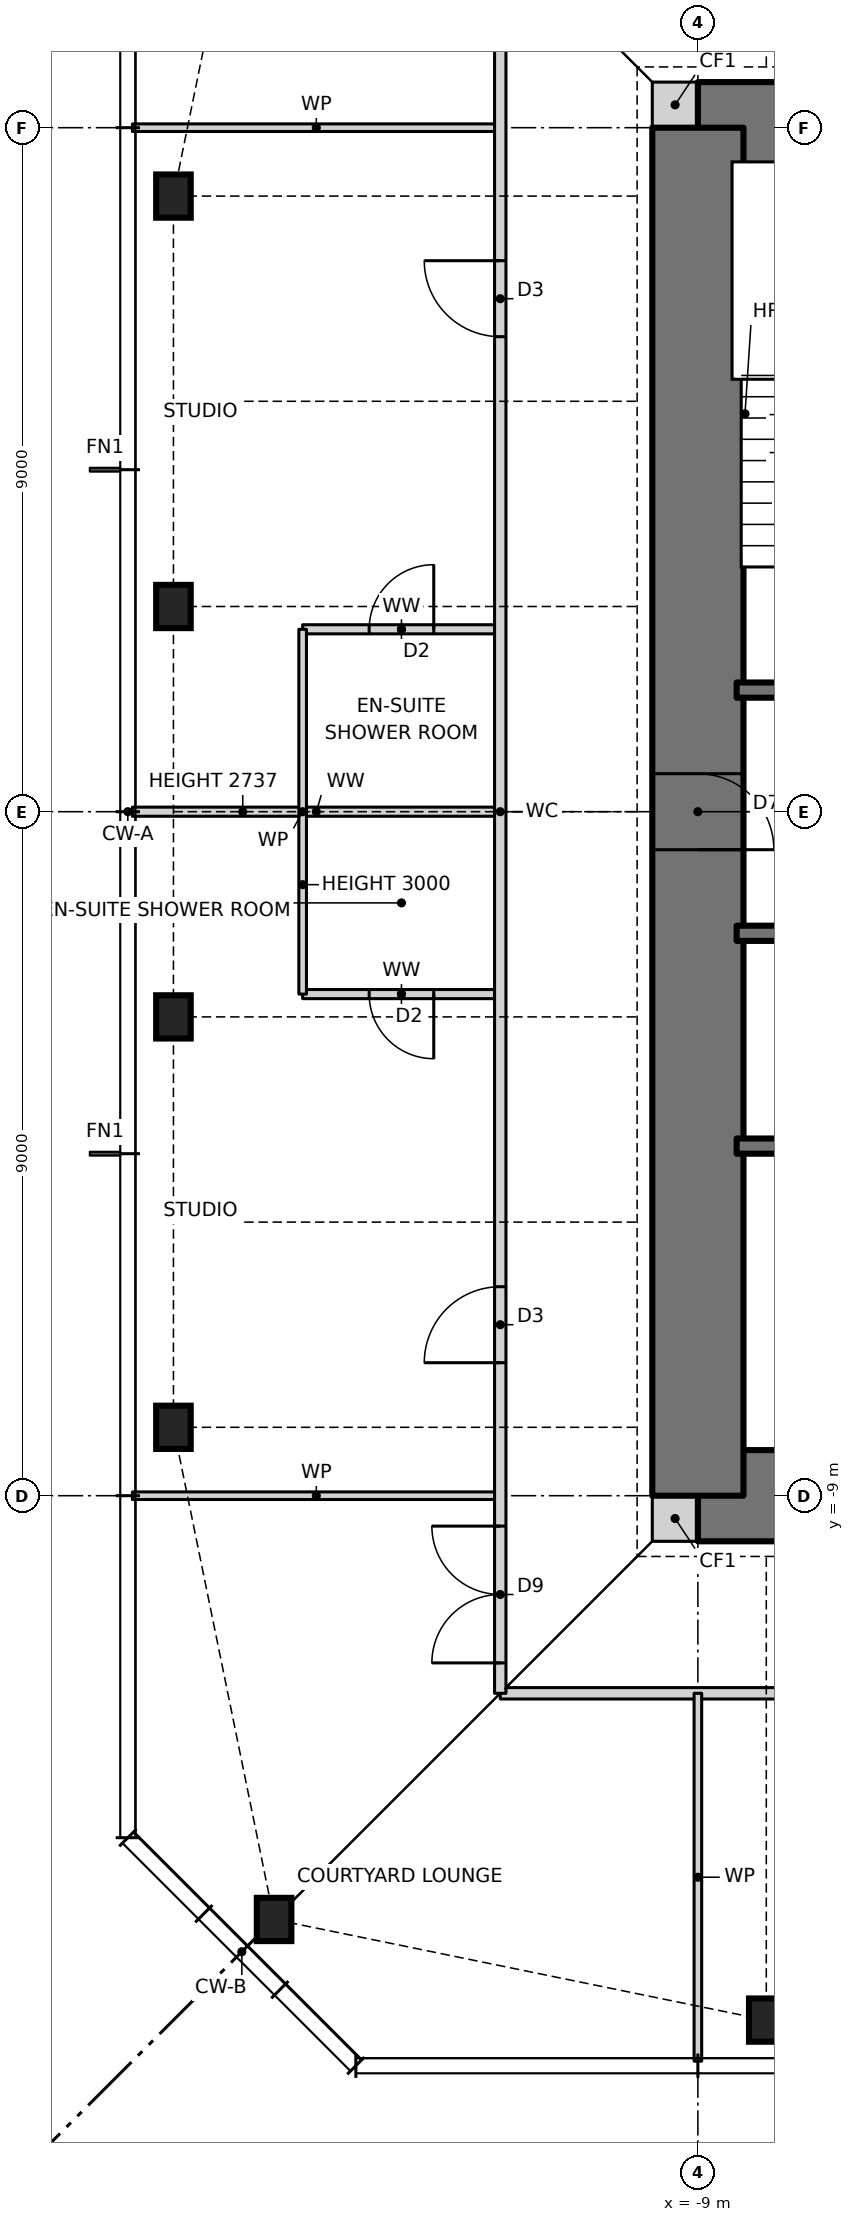
"""IFC4 building model, lengths in metres.
Left out: names, types, materials, properties, quantities, classifications, styles, units other than length and angle.
Written with IfcOpenShell. Run it as: python <this file> out.ifc"""

import sys

from ifc_helpers import new_model, si_unit, direction, frame, frame_2d, origin, origin_2d, place, context, subcontext, project, spatial, rectangle, i_section, extrude, element, fill, save


model = new_model("IFC4")
c1 = context("Model", 3, precision=1e-05, world=origin(), true_north=direction((0.0, 1.0)))
c2 = subcontext(c1, "Body", "Model", "MODEL_VIEW")
j1 = project(units=[si_unit("LENGTHUNIT", "METRE"), si_unit("PLANEANGLEUNIT", "RADIAN")], contexts=[c1])
p1 = place(None, origin())
s1 = spatial("IfcSite", under=j1, at=p1, CompositionType="ELEMENT")
p2 = place(p1, origin())
s2 = spatial("IfcBuilding", under=s1, at=p2, CompositionType="ELEMENT")
p3 = place(p2, frame((0.0, 0.0, 250.0)))
s3 = spatial("IfcBuildingStorey", under=s2, at=p3, CompositionType="ELEMENT", Elevation=250.0)
for number, where, z_axis, x_axis in (
    (1, (-14.576, -14.576, 0.0), (0.0, 0.0, 1.0), (1.0, 0.0, 0.0)),
    (2, (-8.1, -15.9, 0.0), (0.0, 0.0, 1.0), (1.0, 0.0, 0.0)),
    (3, (-15.9, 8.1, 0.0), (0.0, 0.0, 1.0), (1.0, 0.0, 0.0)),
    (4, (-15.9, 2.7, 0.0), (0.0, 0.0, 1.0), (1.0, 0.0, 0.0)),
    (5, (-15.9, -2.7, 0.0), (0.0, 0.0, 1.0), (1.0, 0.0, 0.0)),
    (6, (-15.9, -8.1, 0.0), (0.0, 0.0, 1.0), (1.0, 0.0, 0.0)),
):
    element("IfcColumn", number, at=place(p3, frame(where, z_axis=z_axis, x_axis=x_axis)), inside=s3, PredefinedType="COLUMN", context=c2, shape_type="SweptSolid", body=[
        extrude(i_section(OverallWidth=0.455, OverallDepth=0.569, WebThickness=0.078, FlangeThickness=0.125, at=origin_2d()), origin(), (0.0, 0.0, 1.0), 3.5),
    ])
for number, where, z_axis, x_axis in (
    (7, (-9.6, -9.3, 0.0), (0.0, 0.0, 1.0), (1.0, 0.0, 0.0)),
    (8, (-9.6, 9.3, 0.0), (0.0, 0.0, 1.0), (1.0, 0.0, 0.0)),
):
    element("IfcWall", number, at=place(p3, frame(where, z_axis=z_axis, x_axis=x_axis)), inside=s3, PredefinedType="SOLIDWALL", context=c2, shape_type="SweptSolid", body=[
        extrude(rectangle(XDim=0.6, YDim=0.6, at=frame_2d((0.3, 0.0))), origin(), (0.0, 0.0, 1.0), 3.5),
    ])
p4 = place(p3, frame((-9.0, -9.0, 0.0), z_axis=(0.0, 0.0, 1.0), x_axis=(1.0, 0.0, 0.0)))
e9 = element("IfcWall", 9, at=p4, inside=s3, PredefinedType="SHEAR", context=c2, shape_type="SweptSolid", body=[
    extrude(rectangle(XDim=18.0, YDim=1.2, at=frame_2d((9.0, 0.0))), origin(), (0.0, 0.0, 1.0), 3.5),
])
p5 = place(p4, frame((3.775, 0.0, 0.0)))
e10 = element("IfcOpeningElement", 10, at=p5, cuts=e9, PredefinedType="OPENING", context=c2, shape_type="SweptSolid", body=[
    extrude(rectangle(XDim=0.9, YDim=2.1, at=frame_2d((0.45, 1.05))), frame((0.0, 0.61, 0.0), z_axis=(0.0, -1.0, 0.0), x_axis=(1.0, 0.0, 0.0)), (0.0, 0.0, 1.0), 1.22),
])
p6 = place(p4, frame((10.625, 0.0, 0.0)))
e11 = element("IfcOpeningElement", 11, at=p6, cuts=e9, PredefinedType="OPENING", context=c2, shape_type="SweptSolid", body=[
    extrude(rectangle(XDim=0.9, YDim=2.1, at=frame_2d((0.45, 1.05))), frame((0.0, 0.61, 0.0), z_axis=(0.0, -1.0, 0.0), x_axis=(1.0, 0.0, 0.0)), (0.0, 0.0, 1.0), 1.22),
])
p7 = place(p3, frame((9.0, 9.0, 0.0), z_axis=(0.0, 0.0, 1.0), x_axis=(-1.0, 0.0, 0.0)))
e12 = element("IfcWall", 12, at=p7, inside=s3, PredefinedType="SHEAR", context=c2, shape_type="SweptSolid", body=[
    extrude(rectangle(XDim=18.0, YDim=1.2, at=frame_2d((9.0, 0.0))), origin(), (0.0, 0.0, 1.0), 3.5),
])
p8 = place(p7, frame((11.125, 0.0, 0.0)))
e13 = element("IfcOpeningElement", 13, at=p8, cuts=e12, PredefinedType="OPENING", context=c2, shape_type="SweptSolid", body=[
    extrude(rectangle(XDim=0.9, YDim=2.1, at=frame_2d((0.45, 1.05))), frame((0.0, 0.61, 0.0), z_axis=(0.0, -1.0, 0.0), x_axis=(1.0, 0.0, 0.0)), (0.0, 0.0, 1.0), 1.22),
])
p9 = place(p7, frame((4.275, 0.0, 0.0)))
e14 = element("IfcOpeningElement", 14, at=p9, cuts=e12, PredefinedType="OPENING", context=c2, shape_type="SweptSolid", body=[
    extrude(rectangle(XDim=0.9, YDim=2.1, at=frame_2d((0.45, 1.05))), frame((0.0, 0.61, 0.0), z_axis=(0.0, -1.0, 0.0), x_axis=(1.0, 0.0, 0.0)), (0.0, 0.0, 1.0), 1.22),
])
p10 = place(p3, frame((-9.0, 9.0, 0.0), z_axis=(0.0, 0.0, 1.0), x_axis=(0.0, -1.0, 0.0)))
e15 = element("IfcWall", 15, at=p10, inside=s3, PredefinedType="SHEAR", context=c2, shape_type="SweptSolid", body=[
    extrude(rectangle(XDim=18.0, YDim=1.2, at=frame_2d((9.0, 0.0))), origin(), (0.0, 0.0, 1.0), 3.5),
])
p11 = place(p10, frame((8.5, 0.0, 0.0)))
e16 = element("IfcOpeningElement", 16, at=p11, cuts=e15, PredefinedType="OPENING", context=c2, shape_type="SweptSolid", body=[
    extrude(rectangle(XDim=1.0, YDim=2.1, at=frame_2d((0.5, 1.05))), frame((0.0, 0.61, 0.0), z_axis=(0.0, -1.0, 0.0), x_axis=(1.0, 0.0, 0.0)), (0.0, 0.0, 1.0), 1.22),
])
p12 = place(p3, frame((-11.6, -11.6, 0.0), z_axis=(0.0, 0.0, 1.0), x_axis=(1.0, 0.0, 0.0)))
e17 = element("IfcWall", 17, at=p12, inside=s3, PredefinedType="PARTITIONING", context=c2, shape_type="SweptSolid", body=[
    extrude(rectangle(XDim=23.7, YDim=0.15, at=frame_2d((11.85, 0.0))), origin(), (0.0, 0.0, 1.0), 3.27),
])
p13 = place(p12, frame((4.35, 0.0, 0.0)))
e18 = element("IfcOpeningElement", 18, at=p13, cuts=e17, PredefinedType="OPENING", context=c2, shape_type="SweptSolid", body=[
    extrude(rectangle(XDim=1.0, YDim=2.1, at=frame_2d((0.5, 1.05))), frame((0.0, 0.085, 0.0), z_axis=(0.0, -1.0, 0.0), x_axis=(1.0, 0.0, 0.0)), (0.0, 0.0, 1.0), 0.17),
])
p14 = place(p12, frame((17.85, 0.0, 0.0)))
e19 = element("IfcOpeningElement", 19, at=p14, cuts=e17, PredefinedType="OPENING", context=c2, shape_type="SweptSolid", body=[
    extrude(rectangle(XDim=1.0, YDim=2.1, at=frame_2d((0.5, 1.05))), frame((0.0, 0.085, 0.0), z_axis=(0.0, -1.0, 0.0), x_axis=(1.0, 0.0, 0.0)), (0.0, 0.0, 1.0), 0.17),
])
p15 = place(p12, frame((21.725, 0.0, 0.0)))
e20 = element("IfcOpeningElement", 20, at=p15, cuts=e17, PredefinedType="OPENING", context=c2, shape_type="SweptSolid", body=[
    extrude(rectangle(XDim=0.85, YDim=2.1, at=frame_2d((0.425, 1.05))), frame((0.0, 0.085, 0.0), z_axis=(0.0, -1.0, 0.0), x_axis=(1.0, 0.0, 0.0)), (0.0, 0.0, 1.0), 0.17),
])
p16 = place(p3, frame((-16.44, -9.0, 0.0), z_axis=(0.0, 0.0, 1.0), x_axis=(1.0, 0.0, 0.0)))
e21 = element("IfcWall", 21, at=p16, inside=s3, PredefinedType="PARTITIONING", context=c2, shape_type="SweptSolid", body=[
    extrude(rectangle(XDim=4.84, YDim=0.1, at=frame_2d((2.42, 0.0))), origin(), (0.0, 0.0, 1.0), 3.27),
])
p17 = place(p3, frame((-8.49, -4.4, 0.0), z_axis=(0.0, 0.0, 1.0), x_axis=(1.0, 0.0, 0.0)))
e22 = element("IfcWall", 22, at=p17, inside=s3, PredefinedType="SOLIDWALL", context=c2, shape_type="SweptSolid", body=[
    extrude(rectangle(XDim=13.64, YDim=0.2, at=frame_2d((6.82, 0.0))), origin(), (0.0, 0.0, 1.0), 3.5),
])
p18 = place(p3, frame((-14.2, -2.4, 0.0), z_axis=(0.0, 0.0, 1.0), x_axis=(1.0, 0.0, 0.0)))
e23 = element("IfcWall", 23, at=p18, inside=s3, PredefinedType="PARTITIONING", context=c2, shape_type="SweptSolid", body=[
    extrude(rectangle(XDim=2.6, YDim=0.12, at=frame_2d((1.3, 0.0))), origin(), (0.0, 0.0, 1.0), 3.27),
])
p19 = place(p18, frame((0.875, 0.0, 0.0)))
e24 = element("IfcOpeningElement", 24, at=p19, cuts=e23, PredefinedType="OPENING", context=c2, shape_type="SweptSolid", body=[
    extrude(rectangle(XDim=0.85, YDim=2.1, at=frame_2d((0.425, 1.05))), frame((0.0, 0.07, 0.0), z_axis=(0.0, -1.0, 0.0), x_axis=(1.0, 0.0, 0.0)), (0.0, 0.0, 1.0), 0.14),
])
p20 = place(p3, frame((-8.49, -1.6, 0.0), z_axis=(0.0, 0.0, 1.0), x_axis=(1.0, 0.0, 0.0)))
e25 = element("IfcWall", 25, at=p20, inside=s3, PredefinedType="SOLIDWALL", context=c2, shape_type="SweptSolid", body=[
    extrude(rectangle(XDim=16.98, YDim=0.2, at=frame_2d((8.49, 0.0))), origin(), (0.0, 0.0, 1.0), 3.5),
])
p21 = place(p20, frame((14.81, 0.0, 0.0)))
e26 = element("IfcOpeningElement", 26, at=p21, cuts=e25, PredefinedType="OPENING", context=c2, shape_type="SweptSolid", body=[
    extrude(rectangle(XDim=1.0, YDim=2.1, at=frame_2d((0.5, 1.05))), frame((0.0, 0.11, 0.0), z_axis=(0.0, -1.0, 0.0), x_axis=(1.0, 0.0, 0.0)), (0.0, 0.0, 1.0), 0.22),
])
p22 = place(p20, frame((1.232, 0.0, 0.0)))
e27 = element("IfcOpeningElement", 27, at=p22, cuts=e25, PredefinedType="OPENING", context=c2, shape_type="SweptSolid", body=[
    extrude(rectangle(XDim=0.9, YDim=2.1, at=frame_2d((0.45, 1.05))), frame((0.0, 0.11, 0.0), z_axis=(0.0, -1.0, 0.0), x_axis=(1.0, 0.0, 0.0)), (0.0, 0.0, 1.0), 0.22),
])
p23 = place(p20, frame((4.627, 0.0, 0.0)))
e28 = element("IfcOpeningElement", 28, at=p23, cuts=e25, PredefinedType="OPENING", context=c2, shape_type="SweptSolid", body=[
    extrude(rectangle(XDim=0.9, YDim=2.1, at=frame_2d((0.45, 1.05))), frame((0.0, 0.11, 0.0), z_axis=(0.0, -1.0, 0.0), x_axis=(1.0, 0.0, 0.0)), (0.0, 0.0, 1.0), 0.22),
])
p24 = place(p20, frame((8.052, 0.0, 0.0)))
e29 = element("IfcOpeningElement", 29, at=p24, cuts=e25, PredefinedType="OPENING", context=c2, shape_type="SweptSolid", body=[
    extrude(rectangle(XDim=0.9, YDim=2.1, at=frame_2d((0.45, 1.05))), frame((0.0, 0.11, 0.0), z_axis=(0.0, -1.0, 0.0), x_axis=(1.0, 0.0, 0.0)), (0.0, 0.0, 1.0), 0.22),
])
p25 = place(p20, frame((12.42, 0.0, 0.0)))
e30 = element("IfcOpeningElement", 30, at=p25, cuts=e25, PredefinedType="OPENING", context=c2, shape_type="SweptSolid", body=[
    extrude(rectangle(XDim=0.9, YDim=2.1, at=frame_2d((0.45, 1.05))), frame((0.0, 0.11, 0.0), z_axis=(0.0, -1.0, 0.0), x_axis=(1.0, 0.0, 0.0)), (0.0, 0.0, 1.0), 0.22),
])
p26 = place(p20, frame((10.707, 0.0, 0.0)))
e31 = element("IfcOpeningElement", 31, at=p26, cuts=e25, PredefinedType="OPENING", context=c2, shape_type="SweptSolid", body=[
    extrude(rectangle(XDim=0.9, YDim=2.1, at=frame_2d((0.45, 1.05))), frame((0.0, 0.11, 0.0), z_axis=(0.0, -1.0, 0.0), x_axis=(1.0, 0.0, 0.0)), (0.0, 0.0, 1.0), 0.22),
])
p27 = place(p3, frame((-16.44, 0.0, 0.0), z_axis=(0.0, 0.0, 1.0), x_axis=(1.0, 0.0, 0.0)))
e32 = element("IfcWall", 32, at=p27, inside=s3, PredefinedType="PARTITIONING", context=c2, shape_type="SweptSolid", body=[
    extrude(rectangle(XDim=4.84, YDim=0.12, at=frame_2d((2.42, 0.0))), origin(), (0.0, 0.0, 1.0), 2.737),
])
p28 = place(p3, frame((-8.49, 1.6, 0.0), z_axis=(0.0, 0.0, 1.0), x_axis=(1.0, 0.0, 0.0)))
e33 = element("IfcWall", 33, at=p28, inside=s3, PredefinedType="SOLIDWALL", context=c2, shape_type="SweptSolid", body=[
    extrude(rectangle(XDim=16.98, YDim=0.2, at=frame_2d((8.49, 0.0))), origin(), (0.0, 0.0, 1.0), 3.5),
])
p29 = place(p28, frame((1.17, 0.0, 0.0)))
e34 = element("IfcOpeningElement", 34, at=p29, cuts=e33, PredefinedType="OPENING", context=c2, shape_type="SweptSolid", body=[
    extrude(rectangle(XDim=1.0, YDim=2.1, at=frame_2d((0.5, 1.05))), frame((0.0, 0.11, 0.0), z_axis=(0.0, -1.0, 0.0), x_axis=(1.0, 0.0, 0.0)), (0.0, 0.0, 1.0), 0.22),
])
p30 = place(p28, frame((4.606, 0.0, 0.0)))
e35 = element("IfcOpeningElement", 35, at=p30, cuts=e33, PredefinedType="OPENING", context=c2, shape_type="SweptSolid", body=[
    extrude(rectangle(XDim=0.9, YDim=2.1, at=frame_2d((0.45, 1.05))), frame((0.0, 0.11, 0.0), z_axis=(0.0, -1.0, 0.0), x_axis=(1.0, 0.0, 0.0)), (0.0, 0.0, 1.0), 0.22),
])
p31 = place(p28, frame((8.04, 0.0, 0.0)))
e36 = element("IfcOpeningElement", 36, at=p31, cuts=e33, PredefinedType="OPENING", context=c2, shape_type="SweptSolid", body=[
    extrude(rectangle(XDim=0.9, YDim=2.1, at=frame_2d((0.45, 1.05))), frame((0.0, 0.11, 0.0), z_axis=(0.0, -1.0, 0.0), x_axis=(1.0, 0.0, 0.0)), (0.0, 0.0, 1.0), 0.22),
])
p32 = place(p28, frame((11.374, 0.0, 0.0)))
e37 = element("IfcOpeningElement", 37, at=p32, cuts=e33, PredefinedType="OPENING", context=c2, shape_type="SweptSolid", body=[
    extrude(rectangle(XDim=1.1, YDim=2.1, at=frame_2d((0.55, 1.05))), frame((0.0, 0.11, 0.0), z_axis=(0.0, -1.0, 0.0), x_axis=(1.0, 0.0, 0.0)), (0.0, 0.0, 1.0), 0.22),
])
p33 = place(p28, frame((14.66, 0.0, 0.0)))
e38 = element("IfcOpeningElement", 38, at=p33, cuts=e33, PredefinedType="OPENING", context=c2, shape_type="SweptSolid", body=[
    extrude(rectangle(XDim=1.3, YDim=2.1, at=frame_2d((0.65, 1.05))), frame((0.0, 0.11, 0.0), z_axis=(0.0, -1.0, 0.0), x_axis=(1.0, 0.0, 0.0)), (0.0, 0.0, 1.0), 0.22),
])
p34 = place(p3, frame((-14.2, 2.4, 0.0), z_axis=(0.0, 0.0, 1.0), x_axis=(1.0, 0.0, 0.0)))
e39 = element("IfcWall", 39, at=p34, inside=s3, PredefinedType="PARTITIONING", context=c2, shape_type="SweptSolid", body=[
    extrude(rectangle(XDim=2.6, YDim=0.12, at=frame_2d((1.3, 0.0))), origin(), (0.0, 0.0, 1.0), 3.27),
])
p35 = place(p34, frame((0.875, 0.0, 0.0)))
e40 = element("IfcOpeningElement", 40, at=p35, cuts=e39, PredefinedType="OPENING", context=c2, shape_type="SweptSolid", body=[
    extrude(rectangle(XDim=0.85, YDim=2.1, at=frame_2d((0.425, 1.05))), frame((0.0, 0.07, 0.0), z_axis=(0.0, -1.0, 0.0), x_axis=(1.0, 0.0, 0.0)), (0.0, 0.0, 1.0), 0.14),
])
for number, where, z_axis, x_axis in (
    (41, (-16.44, 9.0, 0.0), (0.0, 0.0, 1.0), (1.0, 0.0, 0.0)),
    (42, (-9.0, -16.44, 0.0), (0.0, 0.0, 1.0), (0.0, 1.0, 0.0)),
):
    element("IfcWall", number, at=place(p3, frame(where, z_axis=z_axis, x_axis=x_axis)), inside=s3, PredefinedType="PARTITIONING", context=c2, shape_type="SweptSolid", body=[
        extrude(rectangle(XDim=4.84, YDim=0.1, at=frame_2d((2.42, 0.0))), origin(), (0.0, 0.0, 1.0), 3.27),
    ])
p36 = place(p3, frame((-11.6, -11.6, 0.0), z_axis=(0.0, 0.0, 1.0), x_axis=(0.0, 1.0, 0.0)))
e43 = element("IfcWall", 43, at=p36, inside=s3, PredefinedType="PARTITIONING", context=c2, shape_type="SweptSolid", body=[
    extrude(rectangle(XDim=23.2, YDim=0.15, at=frame_2d((11.6, 0.0))), origin(), (0.0, 0.0, 1.0), 3.27),
])
p37 = place(p36, frame((17.85, 0.0, 0.0)))
e44 = element("IfcOpeningElement", 44, at=p37, cuts=e43, PredefinedType="OPENING", context=c2, shape_type="SweptSolid", body=[
    extrude(rectangle(XDim=1.0, YDim=2.1, at=frame_2d((0.5, 1.05))), frame((0.0, 0.085, 0.0), z_axis=(0.0, -1.0, 0.0), x_axis=(1.0, 0.0, 0.0)), (0.0, 0.0, 1.0), 0.17),
])
p38 = place(p36, frame((4.35, 0.0, 0.0)))
e45 = element("IfcOpeningElement", 45, at=p38, cuts=e43, PredefinedType="OPENING", context=c2, shape_type="SweptSolid", body=[
    extrude(rectangle(XDim=1.0, YDim=2.1, at=frame_2d((0.5, 1.05))), frame((0.0, 0.085, 0.0), z_axis=(0.0, -1.0, 0.0), x_axis=(1.0, 0.0, 0.0)), (0.0, 0.0, 1.0), 0.17),
])
p39 = place(p36, frame((0.4, 0.0, 0.0)))
e46 = element("IfcOpeningElement", 46, at=p39, cuts=e43, PredefinedType="OPENING", context=c2, shape_type="SweptSolid", body=[
    extrude(rectangle(XDim=1.8, YDim=2.1, at=frame_2d((0.9, 1.05))), frame((0.0, 0.085, 0.0), z_axis=(0.0, -1.0, 0.0), x_axis=(1.0, 0.0, 0.0)), (0.0, 0.0, 1.0), 0.17),
])
p40 = place(p3, frame((-14.2, -2.4, 0.0), z_axis=(0.0, 0.0, 1.0), x_axis=(0.0, 1.0, 0.0)))
e47 = element("IfcWall", 47, at=p40, inside=s3, PredefinedType="PARTITIONING", context=c2, shape_type="SweptSolid", body=[
    extrude(rectangle(XDim=4.8, YDim=0.1, at=frame_2d((2.4, 0.0))), origin(), (0.0, 0.0, 1.0), 3.0),
])
p41 = place(p37, origin())
e48 = element("IfcDoor", 48, at=p41, inside=s3, OperationType="SINGLE_SWING_RIGHT", PredefinedType="DOOR", context=c2, shape_type="SweptSolid", body=[
    extrude(rectangle(XDim=1.0, YDim=2.1, at=frame_2d((0.5, 1.05))), frame((0.0, 0.025, 0.0), z_axis=(0.0, -1.0, 0.0), x_axis=(1.0, 0.0, 0.0)), (0.0, 0.0, 1.0), 0.05),
])
fill(e44, e48)
p42 = place(p35, origin())
e49 = element("IfcDoor", 49, at=p42, inside=s3, OperationType="SINGLE_SWING_RIGHT", PredefinedType="DOOR", context=c2, shape_type="SweptSolid", body=[
    extrude(rectangle(XDim=0.85, YDim=2.1, at=frame_2d((0.425, 1.05))), frame((0.0, 0.025, 0.0), z_axis=(0.0, -1.0, 0.0), x_axis=(1.0, 0.0, 0.0)), (0.0, 0.0, 1.0), 0.05),
])
fill(e40, e49)
p43 = place(p38, origin())
e50 = element("IfcDoor", 50, at=p43, inside=s3, OperationType="SINGLE_SWING_LEFT", PredefinedType="DOOR", context=c2, shape_type="SweptSolid", body=[
    extrude(rectangle(XDim=1.0, YDim=2.1, at=frame_2d((0.5, 1.05))), frame((0.0, 0.025, 0.0), z_axis=(0.0, -1.0, 0.0), x_axis=(1.0, 0.0, 0.0)), (0.0, 0.0, 1.0), 0.05),
])
fill(e45, e50)
p44 = place(p19, frame((0.85, 0.0, 0.0), z_axis=(0.0, 0.0, 1.0), x_axis=(-1.0, 0.0, 0.0)))
e51 = element("IfcDoor", 51, at=p44, inside=s3, OperationType="SINGLE_SWING_LEFT", PredefinedType="DOOR", context=c2, shape_type="SweptSolid", body=[
    extrude(rectangle(XDim=0.85, YDim=2.1, at=frame_2d((0.425, 1.05))), frame((0.0, 0.025, 0.0), z_axis=(0.0, -1.0, 0.0), x_axis=(1.0, 0.0, 0.0)), (0.0, 0.0, 1.0), 0.05),
])
fill(e24, e51)
p45 = place(p39, origin())
e52 = element("IfcDoor", 52, at=p45, inside=s3, OperationType="DOUBLE_DOOR_SINGLE_SWING", PredefinedType="DOOR", context=c2, shape_type="SweptSolid", body=[
    extrude(rectangle(XDim=1.8, YDim=2.1, at=frame_2d((0.9, 1.05))), frame((0.0, 0.025, 0.0), z_axis=(0.0, -1.0, 0.0), x_axis=(1.0, 0.0, 0.0)), (0.0, 0.0, 1.0), 0.05),
])
fill(e46, e52)
p46 = place(p11, origin())
e53 = element("IfcDoor", 53, at=p46, inside=s3, OperationType="SINGLE_SWING_RIGHT", PredefinedType="DOOR", context=c2, shape_type="SweptSolid", body=[
    extrude(rectangle(XDim=1.0, YDim=2.1, at=frame_2d((0.5, 1.05))), frame((0.0, 0.025, 0.0), z_axis=(0.0, -1.0, 0.0), x_axis=(1.0, 0.0, 0.0)), (0.0, 0.0, 1.0), 0.05),
])
fill(e16, e53)
save(model, sys.argv[1])
